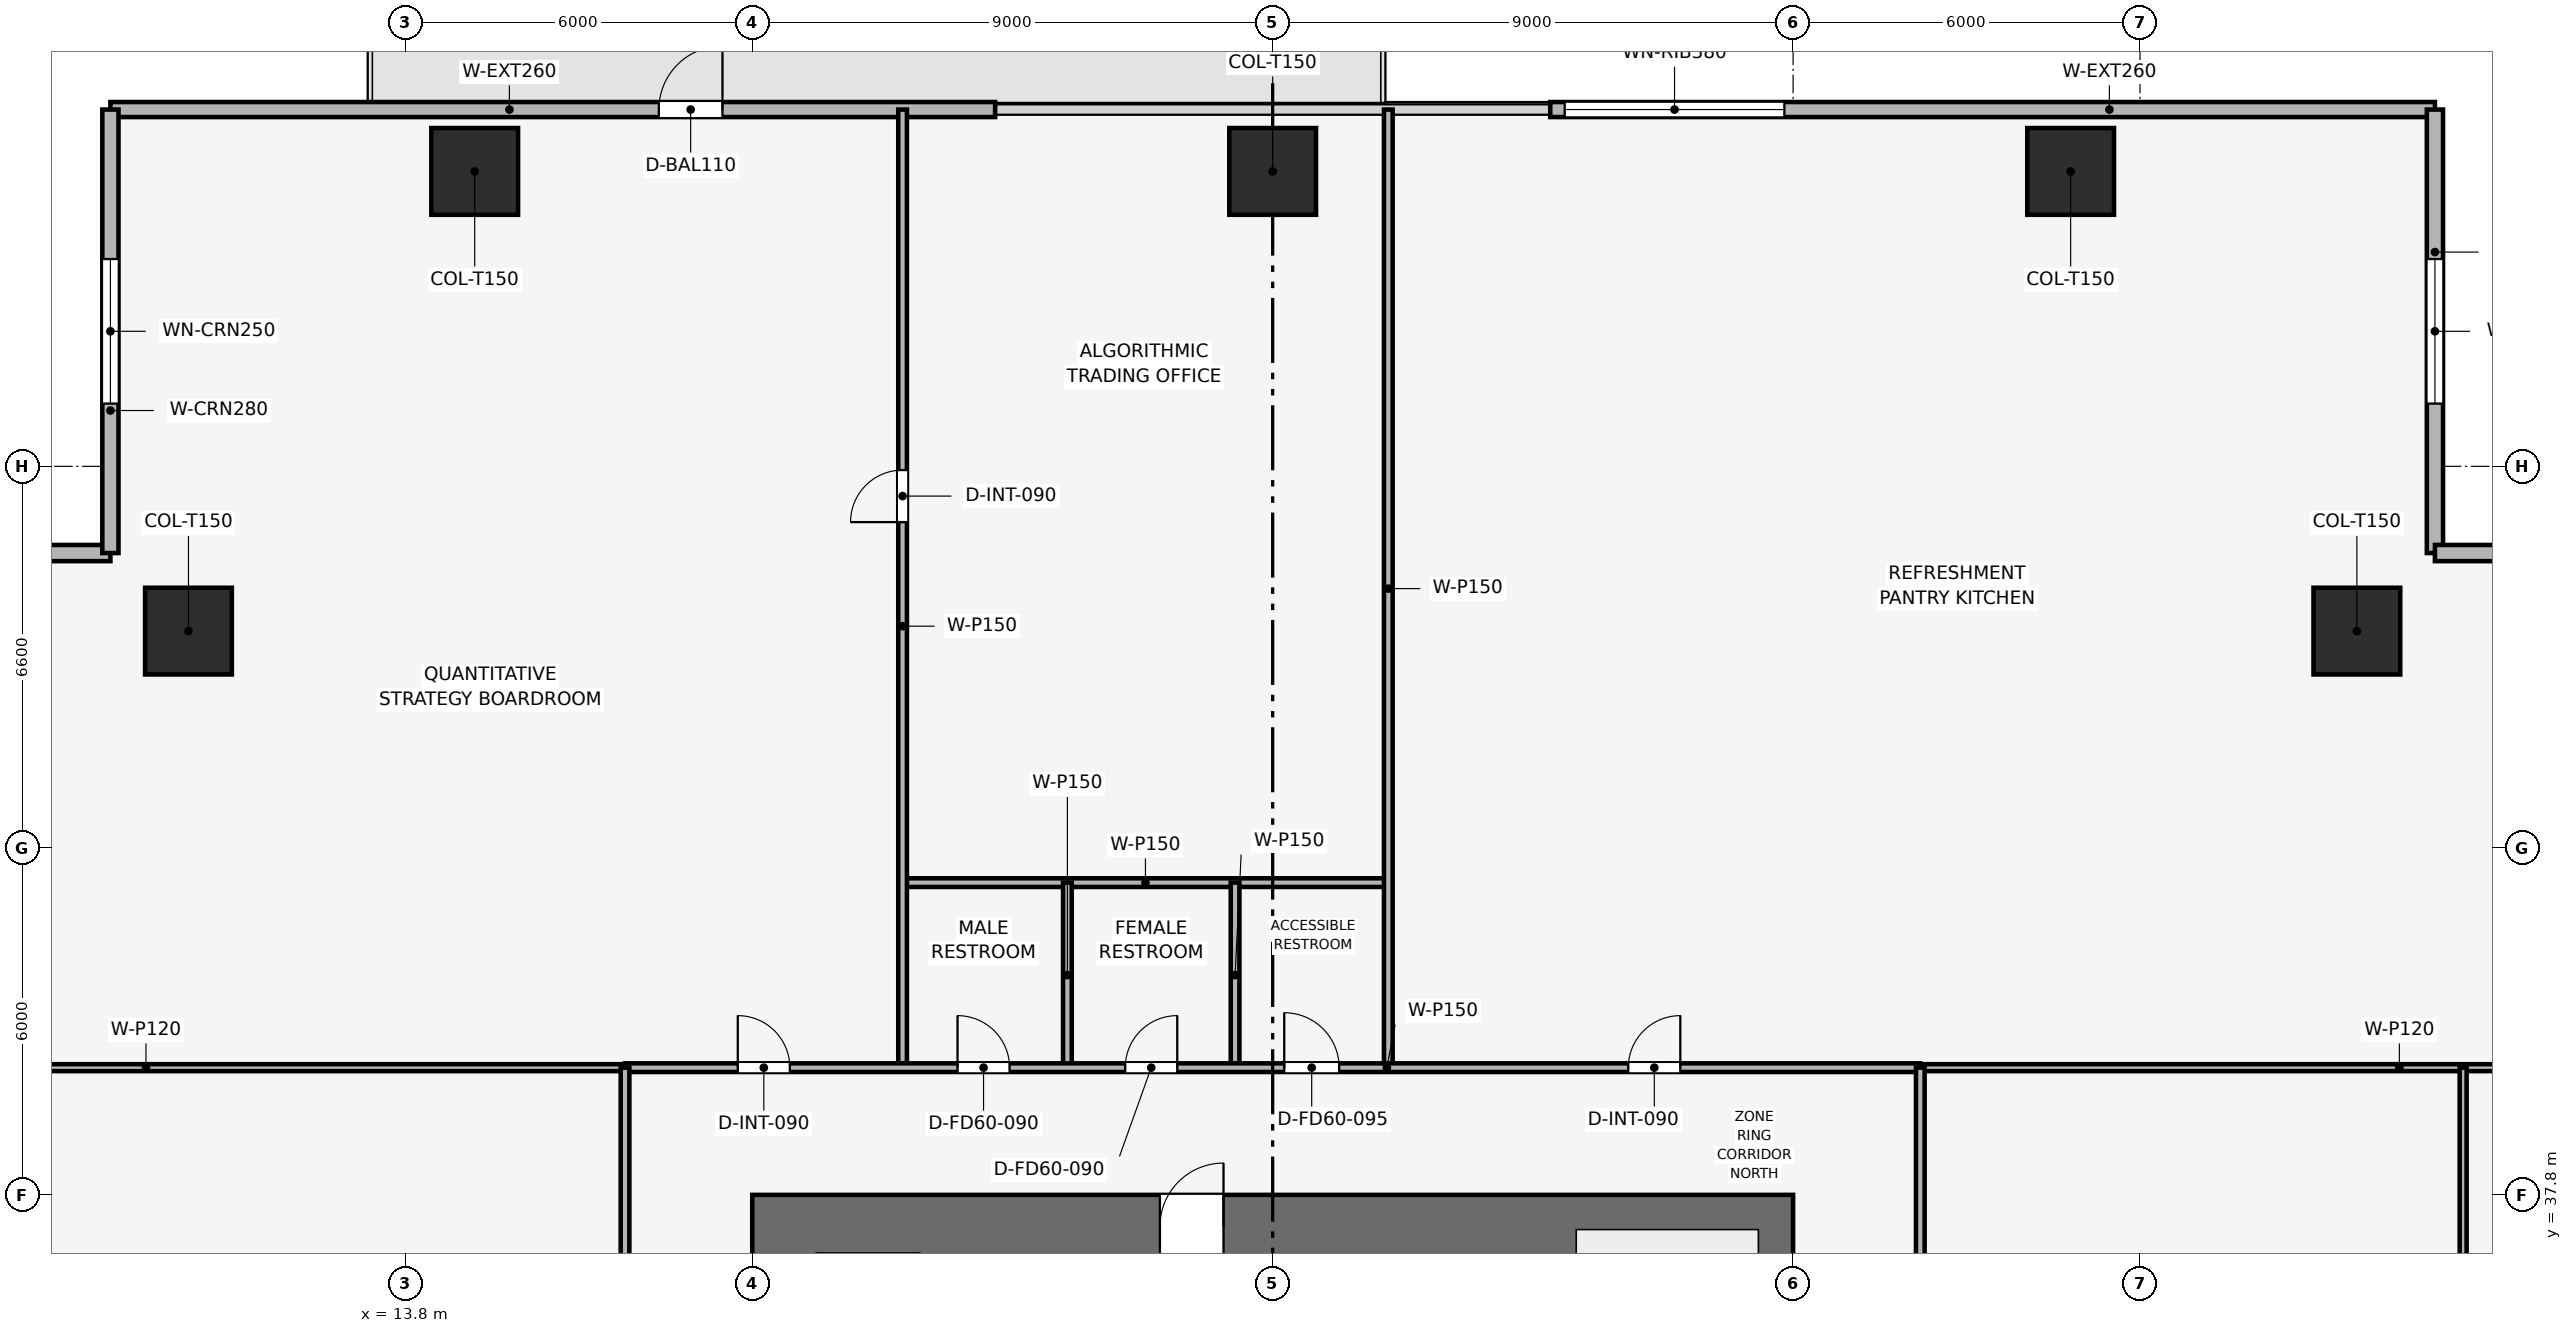
"""IFC4 building model, lengths in metres.
Left out: names, types, materials, properties, quantities, classifications, styles, units other than length and angle.
Written with IfcOpenShell. Run it as: python <this file> out.ifc"""

import sys

from ifc_helpers import new_model, si_unit, direction, frame, frame_2d, origin, origin_2d, place, context, subcontext, project, spatial, rectangle, extrude, element, fill, save


model = new_model("IFC4")
c1 = context("Model", 3, precision=1e-05, world=origin(), true_north=direction((0.0, 1.0)))
c2 = subcontext(c1, "Body", "Model", "MODEL_VIEW")
j1 = project(units=[si_unit("LENGTHUNIT", "METRE"), si_unit("PLANEANGLEUNIT", "RADIAN")], contexts=[c1])
p1 = place(None, origin())
s1 = spatial("IfcSite", under=j1, at=p1, CompositionType="ELEMENT")
p2 = place(p1, origin())
s2 = spatial("IfcBuilding", under=s1, at=p2, CompositionType="ELEMENT")
p3 = place(p2, frame((0.0, 0.0, 96.3)))
s3 = spatial("IfcBuildingStorey", under=s2, at=p3, CompositionType="ELEMENT", Elevation=96.3)
p4 = place(p3, frame((19.8, 37.25, 0.0), z_axis=(0.0, 0.0, 1.0), x_axis=(1.0, 0.0, 0.0)))
e1 = element("IfcWall", 1, at=p4, inside=s3, PredefinedType="SHEAR", context=c2, shape_type="SweptSolid", body=[
    extrude(rectangle(XDim=18.0, YDim=1.1, at=frame_2d((9.0, 0.0))), origin(), (0.0, 0.0, 1.0), 3.9),
])
p5 = place(p4, frame((7.05, 0.0, 0.0)))
e2 = element("IfcOpeningElement", 2, at=p5, cuts=e1, PredefinedType="OPENING", context=c2, shape_type="SweptSolid", body=[
    extrude(rectangle(XDim=1.1, YDim=2.15, at=frame_2d((0.55, 1.075))), frame((0.0, 0.56, 0.0), z_axis=(0.0, -1.0, 0.0), x_axis=(1.0, 0.0, 0.0)), (0.0, 0.0, 1.0), 1.12),
])
for number, where, z_axis, x_axis in (
    (3, (42.6, 55.5, 0.003), (0.0, 0.0, 1.0), (1.0, 0.0, 0.0)),
    (4, (28.8, 55.5, 0.003), (0.0, 0.0, 1.0), (1.0, 0.0, 0.0)),
    (5, (15.0, 55.5, 0.003), (0.0, 0.0, 1.0), (1.0, 0.0, 0.0)),
    (6, (47.55, 47.55, 0.003), (0.0, 0.0, 1.0), (1.0, 0.0, 0.0)),
    (7, (10.05, 47.55, 0.003), (0.0, 0.0, 1.0), (1.0, 0.0, 0.0)),
):
    element("IfcColumn", number, at=place(p3, frame(where, z_axis=z_axis, x_axis=x_axis)), inside=s3, PredefinedType="COLUMN", context=c2, shape_type="SweptSolid", body=[
        extrude(rectangle(XDim=1.5, YDim=1.5, at=origin_2d()), origin(), (0.0, 0.0, 1.0), 3.644),
    ])
p6 = place(p3, frame((8.7, 56.57, 0.0), z_axis=(0.0, 0.0, 1.0), x_axis=(1.0, 0.0, 0.0)))
e8 = element("IfcWall", 8, at=p6, inside=s3, PredefinedType="SOLIDWALL", context=c2, shape_type="SweptSolid", body=[
    extrude(rectangle(XDim=15.3, YDim=0.26, at=frame_2d((7.65, 0.0))), origin(), (0.0, 0.0, 1.0), 3.65),
])
p7 = place(p6, frame((9.485, 0.0, 0.0)))
e9 = element("IfcOpeningElement", 9, at=p7, cuts=e8, PredefinedType="OPENING", context=c2, shape_type="SweptSolid", body=[
    extrude(rectangle(XDim=1.1, YDim=2.2, at=frame_2d((0.55, 1.1))), frame((0.0, 0.14, 0.0), z_axis=(0.0, -1.0, 0.0), x_axis=(1.0, 0.0, 0.0)), (0.0, 0.0, 1.0), 0.28),
])
p8 = place(p3, frame((33.6, 56.57, 0.0), z_axis=(0.0, 0.0, 1.0), x_axis=(1.0, 0.0, 0.0)))
e10 = element("IfcWall", 10, at=p8, inside=s3, PredefinedType="SOLIDWALL", context=c2, shape_type="SweptSolid", body=[
    extrude(rectangle(XDim=15.3, YDim=0.26, at=frame_2d((7.65, 0.0))), origin(), (0.0, 0.0, 1.0), 3.65),
])
p9 = place(p8, frame((0.25, 0.0, 0.9)))
e11 = element("IfcOpeningElement", 11, at=p9, cuts=e10, PredefinedType="OPENING", context=c2, shape_type="SweptSolid", body=[
    extrude(rectangle(XDim=3.8, YDim=1.9, at=frame_2d((1.9, 0.95))), frame((0.0, 0.14, 0.0), z_axis=(0.0, -1.0, 0.0), x_axis=(1.0, 0.0, 0.0)), (0.0, 0.0, 1.0), 0.28),
])
p10 = place(p3, frame((1.03, 48.9, 0.0), z_axis=(0.0, 0.0, 1.0), x_axis=(1.0, 0.0, 0.0)))
e12 = element("IfcWall", 12, at=p10, inside=s3, PredefinedType="SOLIDWALL", context=c2, shape_type="SweptSolid", body=[
    extrude(rectangle(XDim=7.67, YDim=0.28, at=frame_2d((3.835, 0.0))), origin(), (0.0, 0.0, 1.0), 3.65),
])
p11 = place(p10, frame((2.585, 0.0, 0.9)))
e13 = element("IfcOpeningElement", 13, at=p11, cuts=e12, PredefinedType="OPENING", context=c2, shape_type="SweptSolid", body=[
    extrude(rectangle(XDim=2.5, YDim=1.9, at=frame_2d((1.25, 0.95))), frame((0.0, 0.15, 0.0), z_axis=(0.0, -1.0, 0.0), x_axis=(1.0, 0.0, 0.0)), (0.0, 0.0, 1.0), 0.3),
])
p12 = place(p3, frame((8.7, 48.9, 0.0), z_axis=(0.0, 0.0, 1.0), x_axis=(0.0, 1.0, 0.0)))
e14 = element("IfcWall", 14, at=p12, inside=s3, PredefinedType="SOLIDWALL", context=c2, shape_type="SweptSolid", body=[
    extrude(rectangle(XDim=7.67, YDim=0.28, at=frame_2d((3.835, 0.0))), origin(), (0.0, 0.0, 1.0), 3.65),
])
p13 = place(p12, frame((2.585, 0.0, 0.9)))
e15 = element("IfcOpeningElement", 15, at=p13, cuts=e14, PredefinedType="OPENING", context=c2, shape_type="SweptSolid", body=[
    extrude(rectangle(XDim=2.5, YDim=1.9, at=frame_2d((1.25, 0.95))), frame((0.0, 0.15, 0.0), z_axis=(0.0, -1.0, 0.0), x_axis=(1.0, 0.0, 0.0)), (0.0, 0.0, 1.0), 0.3),
])
p14 = place(p3, frame((48.9, 56.57, 0.0), z_axis=(0.0, 0.0, 1.0), x_axis=(0.0, -1.0, 0.0)))
e16 = element("IfcWall", 16, at=p14, inside=s3, PredefinedType="SOLIDWALL", context=c2, shape_type="SweptSolid", body=[
    extrude(rectangle(XDim=7.67, YDim=0.28, at=frame_2d((3.835, 0.0))), origin(), (0.0, 0.0, 1.0), 3.65),
])
p15 = place(p14, frame((2.585, 0.0, 0.9)))
e17 = element("IfcOpeningElement", 17, at=p15, cuts=e16, PredefinedType="OPENING", context=c2, shape_type="SweptSolid", body=[
    extrude(rectangle(XDim=2.5, YDim=1.9, at=frame_2d((1.25, 0.95))), frame((0.0, 0.15, 0.0), z_axis=(0.0, -1.0, 0.0), x_axis=(1.0, 0.0, 0.0)), (0.0, 0.0, 1.0), 0.3),
])
p16 = place(p3, frame((48.9, 48.9, 0.0), z_axis=(0.0, 0.0, 1.0), x_axis=(1.0, 0.0, 0.0)))
e18 = element("IfcWall", 18, at=p16, inside=s3, PredefinedType="SOLIDWALL", context=c2, shape_type="SweptSolid", body=[
    extrude(rectangle(XDim=7.67, YDim=0.28, at=frame_2d((3.835, 0.0))), origin(), (0.0, 0.0, 1.0), 3.65),
])
p17 = place(p16, frame((2.585, 0.0, 0.9)))
e19 = element("IfcOpeningElement", 19, at=p17, cuts=e18, PredefinedType="OPENING", context=c2, shape_type="SweptSolid", body=[
    extrude(rectangle(XDim=2.5, YDim=1.9, at=frame_2d((1.25, 0.95))), frame((0.0, 0.15, 0.0), z_axis=(0.0, -1.0, 0.0), x_axis=(1.0, 0.0, 0.0)), (0.0, 0.0, 1.0), 0.3),
])
p18 = place(p3, frame((22.4, 43.2, 0.0), z_axis=(0.0, 0.0, 1.0), x_axis=(1.0, 0.0, 0.0)))
e20 = element("IfcWall", 20, at=p18, inside=s3, PredefinedType="PARTITIONING", context=c2, shape_type="SweptSolid", body=[
    extrude(rectangle(XDim=8.4, YDim=0.15, at=frame_2d((4.2, 0.0))), origin(), (0.0, 0.0, 1.0), 3.085),
])
p19 = place(p3, frame((22.4, 40.0, 0.0), z_axis=(0.0, 0.0, 1.0), x_axis=(0.0, 1.0, 0.0)))
e21 = element("IfcWall", 21, at=p19, inside=s3, PredefinedType="PARTITIONING", context=c2, shape_type="SweptSolid", body=[
    extrude(rectangle(XDim=16.57, YDim=0.15, at=frame_2d((8.285, 0.0))), origin(), (0.0, 0.0, 1.0), 2.935),
])
p20 = place(p19, frame((9.435, 0.0, 0.0)))
e22 = element("IfcOpeningElement", 22, at=p20, cuts=e21, PredefinedType="OPENING", context=c2, shape_type="SweptSolid", body=[
    extrude(rectangle(XDim=0.9, YDim=2.1, at=frame_2d((0.45, 1.05))), frame((0.0, 0.085, 0.0), z_axis=(0.0, -1.0, 0.0), x_axis=(1.0, 0.0, 0.0)), (0.0, 0.0, 1.0), 0.17),
])
p21 = place(p3, frame((30.8, 40.0, 0.0), z_axis=(0.0, 0.0, 1.0), x_axis=(0.0, 1.0, 0.0)))
e23 = element("IfcWall", 23, at=p21, inside=s3, PredefinedType="PARTITIONING", context=c2, shape_type="SweptSolid", body=[
    extrude(rectangle(XDim=16.57, YDim=0.15, at=frame_2d((8.285, 0.0))), origin(), (0.0, 0.0, 1.0), 2.935),
])
for number, where, z_axis, x_axis in (
    (24, (25.25, 40.0, 0.0), (0.0, 0.0, 1.0), (0.0, 1.0, 0.0)),
    (25, (28.15, 40.0, 0.0), (0.0, 0.0, 1.0), (0.0, 1.0, 0.0)),
):
    element("IfcWall", number, at=place(p3, frame(where, z_axis=z_axis, x_axis=x_axis)), inside=s3, PredefinedType="PARTITIONING", context=c2, shape_type="SweptSolid", body=[
        extrude(rectangle(XDim=3.2, YDim=0.15, at=frame_2d((1.6, 0.0))), origin(), (0.0, 0.0, 1.0), 3.65),
    ])
for number, where, z_axis, x_axis in (
    (26, (1.03, 40.0, 0.0), (0.0, 0.0, 1.0), (1.0, 0.0, 0.0)),
    (27, (40.0, 40.0, 0.0), (0.0, 0.0, 1.0), (1.0, 0.0, 0.0)),
):
    element("IfcWall", number, at=place(p3, frame(where, z_axis=z_axis, x_axis=x_axis)), inside=s3, PredefinedType="PARTITIONING", context=c2, shape_type="SweptSolid", body=[
        extrude(rectangle(XDim=16.57, YDim=0.12, at=frame_2d((8.285, 0.0))), origin(), (0.0, 0.0, 1.0), 2.935),
    ])
p22 = place(p3, frame((49.388, 23.638, 0.0), z_axis=(0.0, 0.0, 1.0), x_axis=(0.0, 1.0, 0.0)))
e28 = element("IfcWall", 28, at=p22, inside=s3, PredefinedType="PARTITIONING", context=c2, shape_type="SweptSolid", body=[
    extrude(rectangle(XDim=16.362, YDim=0.12, at=frame_2d((8.181, 0.0))), origin(), (0.0, 0.0, 1.0), 3.085),
])
p23 = place(p22, frame((11.496, 0.0, 0.0)))
e29 = element("IfcOpeningElement", 29, at=p23, cuts=e28, PredefinedType="OPENING", context=c2, shape_type="SweptSolid", body=[
    extrude(rectangle(XDim=0.9, YDim=2.1, at=frame_2d((0.45, 1.05))), frame((0.0, 0.07, 0.0), z_axis=(0.0, -1.0, 0.0), x_axis=(1.0, 0.0, 0.0)), (0.0, 0.0, 1.0), 0.14),
])
p24 = place(p3, frame((17.6, 40.0, 0.0), z_axis=(0.0, 0.0, 1.0), x_axis=(1.0, 0.0, 0.0)))
e30 = element("IfcWall", 30, at=p24, inside=s3, PredefinedType="PARTITIONING", context=c2, shape_type="SweptSolid", body=[
    extrude(rectangle(XDim=22.4, YDim=0.15, at=frame_2d((11.2, 0.0))), origin(), (0.0, 0.0, 1.0), 3.085),
])
p25 = place(p24, frame((1.95, 0.0, 0.0)))
e31 = element("IfcOpeningElement", 31, at=p25, cuts=e30, PredefinedType="OPENING", context=c2, shape_type="SweptSolid", body=[
    extrude(rectangle(XDim=0.9, YDim=2.1, at=frame_2d((0.45, 1.05))), frame((0.0, 0.085, 0.0), z_axis=(0.0, -1.0, 0.0), x_axis=(1.0, 0.0, 0.0)), (0.0, 0.0, 1.0), 0.17),
])
p26 = place(p24, frame((5.75, 0.0, 0.0)))
e32 = element("IfcOpeningElement", 32, at=p26, cuts=e30, PredefinedType="OPENING", context=c2, shape_type="SweptSolid", body=[
    extrude(rectangle(XDim=0.9, YDim=2.1, at=frame_2d((0.45, 1.05))), frame((0.0, 0.085, 0.0), z_axis=(0.0, -1.0, 0.0), x_axis=(1.0, 0.0, 0.0)), (0.0, 0.0, 1.0), 0.17),
])
p27 = place(p24, frame((8.65, 0.0, 0.0)))
e33 = element("IfcOpeningElement", 33, at=p27, cuts=e30, PredefinedType="OPENING", context=c2, shape_type="SweptSolid", body=[
    extrude(rectangle(XDim=0.9, YDim=2.1, at=frame_2d((0.45, 1.05))), frame((0.0, 0.085, 0.0), z_axis=(0.0, -1.0, 0.0), x_axis=(1.0, 0.0, 0.0)), (0.0, 0.0, 1.0), 0.17),
])
p28 = place(p24, frame((11.4, 0.0, 0.0)))
e34 = element("IfcOpeningElement", 34, at=p28, cuts=e30, PredefinedType="OPENING", context=c2, shape_type="SweptSolid", body=[
    extrude(rectangle(XDim=0.95, YDim=2.1, at=frame_2d((0.475, 1.05))), frame((0.0, 0.085, 0.0), z_axis=(0.0, -1.0, 0.0), x_axis=(1.0, 0.0, 0.0)), (0.0, 0.0, 1.0), 0.17),
])
p29 = place(p24, frame((17.35, 0.0, 0.0)))
e35 = element("IfcOpeningElement", 35, at=p29, cuts=e30, PredefinedType="OPENING", context=c2, shape_type="SweptSolid", body=[
    extrude(rectangle(XDim=0.9, YDim=2.1, at=frame_2d((0.45, 1.05))), frame((0.0, 0.085, 0.0), z_axis=(0.0, -1.0, 0.0), x_axis=(1.0, 0.0, 0.0)), (0.0, 0.0, 1.0), 0.17),
])
p30 = place(p3, frame((17.6, 17.6, 0.0), z_axis=(0.0, 0.0, 1.0), x_axis=(0.0, 1.0, 0.0)))
e36 = element("IfcWall", 36, at=p30, inside=s3, PredefinedType="PARTITIONING", context=c2, shape_type="SweptSolid", body=[
    extrude(rectangle(XDim=22.4, YDim=0.15, at=frame_2d((11.2, 0.0))), origin(), (0.0, 0.0, 1.0), 3.085),
])
p31 = place(p30, frame((10.75, 0.0, 0.0)))
e37 = element("IfcOpeningElement", 37, at=p31, cuts=e36, PredefinedType="OPENING", context=c2, shape_type="SweptSolid", body=[
    extrude(rectangle(XDim=0.9, YDim=2.1, at=frame_2d((0.45, 1.05))), frame((0.0, 0.085, 0.0), z_axis=(0.0, -1.0, 0.0), x_axis=(1.0, 0.0, 0.0)), (0.0, 0.0, 1.0), 0.17),
])
p32 = place(p3, frame((40.0, 17.6, 0.0), z_axis=(0.0, 0.0, 1.0), x_axis=(0.0, 1.0, 0.0)))
e38 = element("IfcWall", 38, at=p32, inside=s3, PredefinedType="PARTITIONING", context=c2, shape_type="SweptSolid", body=[
    extrude(rectangle(XDim=22.4, YDim=0.15, at=frame_2d((11.2, 0.0))), origin(), (0.0, 0.0, 1.0), 3.085),
])
p33 = place(p32, frame((2.569, 0.0, 0.0)))
e39 = element("IfcOpeningElement", 39, at=p33, cuts=e38, PredefinedType="OPENING", context=c2, shape_type="SweptSolid", body=[
    extrude(rectangle(XDim=0.9, YDim=2.1, at=frame_2d((0.45, 1.05))), frame((0.0, 0.085, 0.0), z_axis=(0.0, -1.0, 0.0), x_axis=(1.0, 0.0, 0.0)), (0.0, 0.0, 1.0), 0.17),
])
p34 = place(p32, frame((13.769, 0.0, 0.0)))
e40 = element("IfcOpeningElement", 40, at=p34, cuts=e38, PredefinedType="OPENING", context=c2, shape_type="SweptSolid", body=[
    extrude(rectangle(XDim=0.9, YDim=2.1, at=frame_2d((0.45, 1.05))), frame((0.0, 0.085, 0.0), z_axis=(0.0, -1.0, 0.0), x_axis=(1.0, 0.0, 0.0)), (0.0, 0.0, 1.0), 0.17),
])
p35 = place(p7, origin())
e41 = element("IfcDoor", 41, at=p35, inside=s3, OperationType="SINGLE_SWING_RIGHT", PredefinedType="DOOR", context=c2, shape_type="SweptSolid", body=[
    extrude(rectangle(XDim=1.1, YDim=2.2, at=frame_2d((0.55, 1.1))), frame((0.0, 0.025, 0.0), z_axis=(0.0, -1.0, 0.0), x_axis=(1.0, 0.0, 0.0)), (0.0, 0.0, 1.0), 0.05),
])
fill(e9, e41)
p36 = place(p9, origin())
e42 = element("IfcWindow", 42, at=p36, inside=s3, PartitioningType="SINGLE_PANEL", PredefinedType="WINDOW", context=c2, shape_type="SweptSolid", body=[
    extrude(rectangle(XDim=3.8, YDim=1.9, at=frame_2d((1.9, 0.95))), frame((0.0, 0.03, 0.0), z_axis=(0.0, -1.0, 0.0), x_axis=(1.0, 0.0, 0.0)), (0.0, 0.0, 1.0), 0.06),
])
fill(e11, e42)
p37 = place(p13, origin())
e43 = element("IfcWindow", 43, at=p37, inside=s3, PartitioningType="SINGLE_PANEL", PredefinedType="WINDOW", context=c2, shape_type="SweptSolid", body=[
    extrude(rectangle(XDim=2.5, YDim=1.9, at=frame_2d((1.25, 0.95))), frame((0.0, 0.03, 0.0), z_axis=(0.0, -1.0, 0.0), x_axis=(1.0, 0.0, 0.0)), (0.0, 0.0, 1.0), 0.06),
])
fill(e15, e43)
p38 = place(p15, origin())
e44 = element("IfcWindow", 44, at=p38, inside=s3, PartitioningType="SINGLE_PANEL", PredefinedType="WINDOW", context=c2, shape_type="SweptSolid", body=[
    extrude(rectangle(XDim=2.5, YDim=1.9, at=frame_2d((1.25, 0.95))), frame((0.0, 0.03, 0.0), z_axis=(0.0, -1.0, 0.0), x_axis=(1.0, 0.0, 0.0)), (0.0, 0.0, 1.0), 0.06),
])
fill(e17, e44)
p39 = place(p20, origin())
e45 = element("IfcDoor", 45, at=p39, inside=s3, OperationType="SINGLE_SWING_LEFT", PredefinedType="DOOR", context=c2, shape_type="SweptSolid", body=[
    extrude(rectangle(XDim=0.9, YDim=2.1, at=frame_2d((0.45, 1.05))), frame((0.0, 0.025, 0.0), z_axis=(0.0, -1.0, 0.0), x_axis=(1.0, 0.0, 0.0)), (0.0, 0.0, 1.0), 0.05),
])
fill(e22, e45)
p40 = place(p25, origin())
e46 = element("IfcDoor", 46, at=p40, inside=s3, OperationType="SINGLE_SWING_LEFT", PredefinedType="DOOR", context=c2, shape_type="SweptSolid", body=[
    extrude(rectangle(XDim=0.9, YDim=2.1, at=frame_2d((0.45, 1.05))), frame((0.0, 0.025, 0.0), z_axis=(0.0, -1.0, 0.0), x_axis=(1.0, 0.0, 0.0)), (0.0, 0.0, 1.0), 0.05),
])
fill(e31, e46)
p41 = place(p26, origin())
e47 = element("IfcDoor", 47, at=p41, inside=s3, OperationType="SINGLE_SWING_LEFT", PredefinedType="DOOR", context=c2, shape_type="SweptSolid", body=[
    extrude(rectangle(XDim=0.9, YDim=2.1, at=frame_2d((0.45, 1.05))), frame((0.0, 0.025, 0.0), z_axis=(0.0, -1.0, 0.0), x_axis=(1.0, 0.0, 0.0)), (0.0, 0.0, 1.0), 0.05),
])
fill(e32, e47)
p42 = place(p27, origin())
e48 = element("IfcDoor", 48, at=p42, inside=s3, OperationType="SINGLE_SWING_RIGHT", PredefinedType="DOOR", context=c2, shape_type="SweptSolid", body=[
    extrude(rectangle(XDim=0.9, YDim=2.1, at=frame_2d((0.45, 1.05))), frame((0.0, 0.025, 0.0), z_axis=(0.0, -1.0, 0.0), x_axis=(1.0, 0.0, 0.0)), (0.0, 0.0, 1.0), 0.05),
])
fill(e33, e48)
p43 = place(p28, origin())
e49 = element("IfcDoor", 49, at=p43, inside=s3, OperationType="SINGLE_SWING_LEFT", PredefinedType="DOOR", context=c2, shape_type="SweptSolid", body=[
    extrude(rectangle(XDim=0.95, YDim=2.1, at=frame_2d((0.475, 1.05))), frame((0.0, 0.025, 0.0), z_axis=(0.0, -1.0, 0.0), x_axis=(1.0, 0.0, 0.0)), (0.0, 0.0, 1.0), 0.05),
])
fill(e34, e49)
p44 = place(p29, origin())
e50 = element("IfcDoor", 50, at=p44, inside=s3, OperationType="SINGLE_SWING_RIGHT", PredefinedType="DOOR", context=c2, shape_type="SweptSolid", body=[
    extrude(rectangle(XDim=0.9, YDim=2.1, at=frame_2d((0.45, 1.05))), frame((0.0, 0.025, 0.0), z_axis=(0.0, -1.0, 0.0), x_axis=(1.0, 0.0, 0.0)), (0.0, 0.0, 1.0), 0.05),
])
fill(e35, e50)
p45 = place(p5, origin())
e51 = element("IfcDoor", 51, at=p45, inside=s3, OperationType="SINGLE_SWING_RIGHT", PredefinedType="DOOR", context=c2, shape_type="SweptSolid", body=[
    extrude(rectangle(XDim=1.1, YDim=2.15, at=frame_2d((0.55, 1.075))), frame((0.0, 0.025, 0.0), z_axis=(0.0, -1.0, 0.0), x_axis=(1.0, 0.0, 0.0)), (0.0, 0.0, 1.0), 0.05),
])
fill(e2, e51)
save(model, sys.argv[1])
